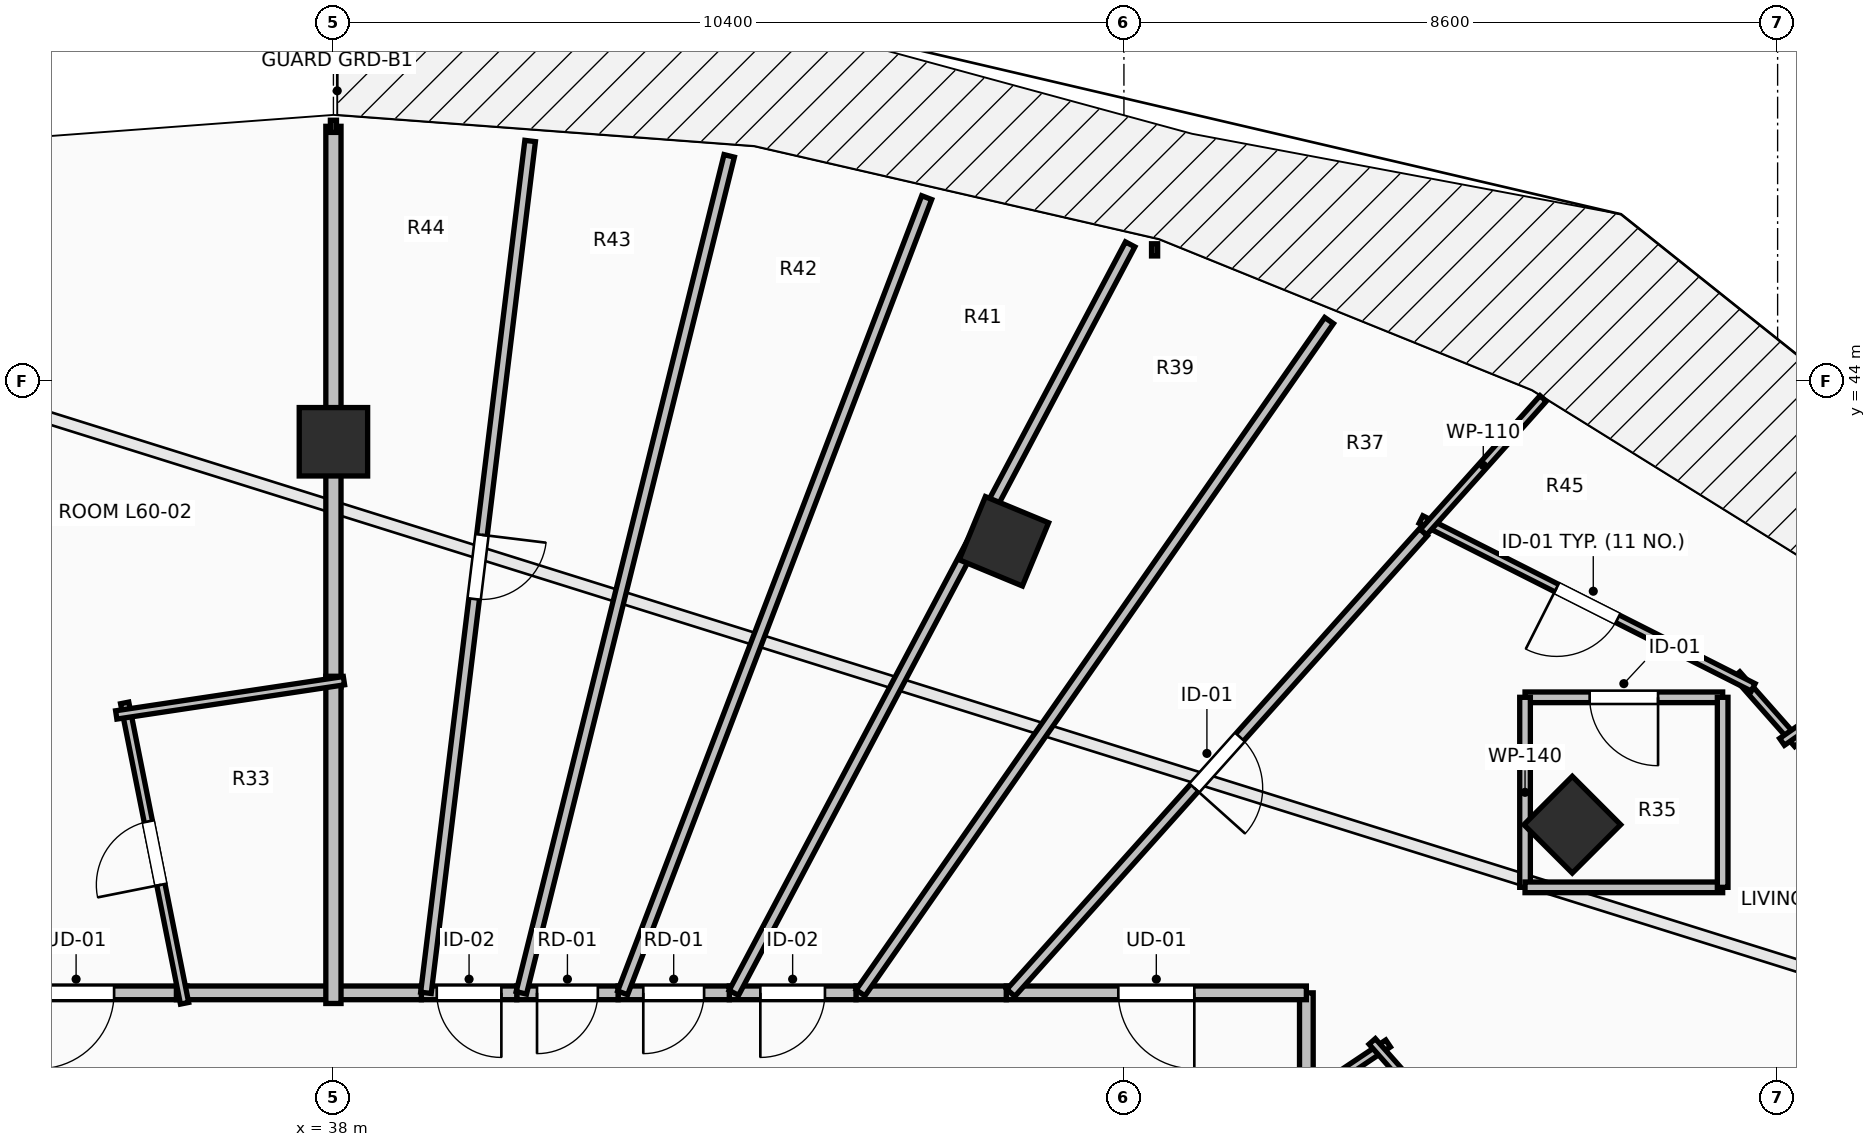
"""IFC4 building model, lengths in metres.
Left out: names, types, materials, properties, quantities, classifications, styles, units other than length and angle.
Written with IfcOpenShell. Run it as: python <this file> out.ifc"""

import sys

from ifc_helpers import new_model, si_unit, direction, frame, frame_2d, origin, origin_2d, place, context, subcontext, project, spatial, rectangle, extrude, element, fill, save


model = new_model("IFC4")
c1 = context("Model", 3, precision=1e-05, world=origin(), true_north=direction((0.0, 1.0)))
c2 = subcontext(c1, "Body", "Model", "MODEL_VIEW")
j1 = project(units=[si_unit("LENGTHUNIT", "METRE"), si_unit("PLANEANGLEUNIT", "RADIAN")], contexts=[c1])
p1 = place(None, origin())
s1 = spatial("IfcSite", under=j1, at=p1, CompositionType="ELEMENT")
p2 = place(p1, origin())
s2 = spatial("IfcBuilding", under=s1, at=p2, CompositionType="ELEMENT")
p3 = place(p2, frame((0.0, 0.0, 221.4)))
s3 = spatial("IfcBuildingStorey", under=s2, at=p3, CompositionType="ELEMENT", Elevation=221.4)
for number, where, z_axis, x_axis in (
    (1, (54.299, 38.162, 0.0), (0.0, 0.0, 1.0), (0.707, 0.707, 0.0)),
    (2, (46.821, 41.891, 0.0), (0.0, 0.0, 1.0), (0.383, 0.924, 0.0)),
    (3, (38.0, 43.2, 0.0), (0.0, 0.0, 1.0), (0.0, 1.0, 0.0)),
):
    element("IfcColumn", number, at=place(p3, frame(where, z_axis=z_axis, x_axis=x_axis)), inside=s3, PredefinedType="COLUMN", context=c2, shape_type="SweptSolid", body=[
        extrude(rectangle(XDim=0.9, YDim=0.9, at=origin_2d()), origin(), (0.0, 0.0, 1.0), 3.55),
    ])
p4 = place(p3, frame((50.8, 34.504, 0.0), z_axis=(0.0, 0.0, 1.0), x_axis=(0.0, 1.0, 0.0)))
e4 = element("IfcWall", 4, at=p4, inside=s3, PredefinedType="PARTITIONING", context=c2, shape_type="SweptSolid", body=[
    extrude(rectangle(XDim=1.446, YDim=0.18, at=frame_2d((0.723, 0.0))), origin(), (0.0, 0.0, 1.0), 2.392),
])
p5 = place(p3, frame((50.8, 35.95, 0.0), z_axis=(0.0, 0.0, 1.0), x_axis=(-1.0, 0.0, 0.0)))
e5 = element("IfcWall", 5, at=p5, inside=s3, PredefinedType="PARTITIONING", context=c2, shape_type="SweptSolid", body=[
    extrude(rectangle(XDim=3.948, YDim=0.18, at=frame_2d((1.974, 0.0))), origin(), (0.0, 0.0, 1.0), 2.392),
])
p6 = place(p5, frame((1.474, 0.0, 0.0)))
e6 = element("IfcOpeningElement", 6, at=p6, cuts=e5, PredefinedType="OPENING", context=c2, shape_type="SweptSolid", body=[
    extrude(rectangle(XDim=1.0, YDim=2.15, at=frame_2d((0.5, 1.075))), frame((0.0, 0.105, 0.0), z_axis=(0.0, -1.0, 0.0), x_axis=(1.0, 0.0, 0.0)), (0.0, 0.0, 1.0), 0.21),
])
p7 = place(p3, frame((46.852, 35.95, 0.0), z_axis=(0.0, 0.0, 1.0), x_axis=(-1.0, 0.0, 0.0)))
e7 = element("IfcWall", 7, at=p7, inside=s3, PredefinedType="PARTITIONING", context=c2, shape_type="SweptSolid", body=[
    extrude(rectangle(XDim=1.977, YDim=0.18, at=frame_2d((0.989, 0.0))), origin(), (0.0, 0.0, 1.0), 3.2),
])
p8 = place(p3, frame((44.875, 35.95, 0.0), z_axis=(0.0, 0.0, 1.0), x_axis=(-1.0, 0.0, 0.0)))
e8 = element("IfcWall", 8, at=p8, inside=s3, PredefinedType="PARTITIONING", context=c2, shape_type="SweptSolid", body=[
    extrude(rectangle(XDim=1.667, YDim=0.18, at=frame_2d((0.833, 0.0))), origin(), (0.0, 0.0, 1.0), 3.2),
])
p9 = place(p8, frame((0.408, 0.0, 0.0)))
e9 = element("IfcOpeningElement", 9, at=p9, cuts=e8, PredefinedType="OPENING", context=c2, shape_type="SweptSolid", body=[
    extrude(rectangle(XDim=0.85, YDim=2.1, at=frame_2d((0.425, 1.05))), frame((0.0, 0.105, 0.0), z_axis=(0.0, -1.0, 0.0), x_axis=(1.0, 0.0, 0.0)), (0.0, 0.0, 1.0), 0.21),
])
p10 = place(p3, frame((43.208, 35.95, 0.0), z_axis=(0.0, 0.0, 1.0), x_axis=(-1.0, 0.0, 0.0)))
e10 = element("IfcWall", 10, at=p10, inside=s3, PredefinedType="PARTITIONING", context=c2, shape_type="SweptSolid", body=[
    extrude(rectangle(XDim=1.463, YDim=0.18, at=frame_2d((0.731, 0.0))), origin(), (0.0, 0.0, 1.0), 3.2),
])
p11 = place(p10, frame((0.332, 0.0, 0.0)))
e11 = element("IfcOpeningElement", 11, at=p11, cuts=e10, PredefinedType="OPENING", context=c2, shape_type="SweptSolid", body=[
    extrude(rectangle(XDim=0.8, YDim=2.05, at=frame_2d((0.4, 1.025))), frame((0.0, 0.105, 0.0), z_axis=(0.0, -1.0, 0.0), x_axis=(1.0, 0.0, 0.0)), (0.0, 0.0, 1.0), 0.21),
])
p12 = place(p3, frame((41.745, 35.95, 0.0), z_axis=(0.0, 0.0, 1.0), x_axis=(-1.0, 0.0, 0.0)))
e12 = element("IfcWall", 12, at=p12, inside=s3, PredefinedType="PARTITIONING", context=c2, shape_type="SweptSolid", body=[
    extrude(rectangle(XDim=1.333, YDim=0.18, at=frame_2d((0.667, 0.0))), origin(), (0.0, 0.0, 1.0), 3.2),
])
p13 = place(p12, frame((0.267, 0.0, 0.0)))
e13 = element("IfcOpeningElement", 13, at=p13, cuts=e12, PredefinedType="OPENING", context=c2, shape_type="SweptSolid", body=[
    extrude(rectangle(XDim=0.8, YDim=2.05, at=frame_2d((0.4, 1.025))), frame((0.0, 0.105, 0.0), z_axis=(0.0, -1.0, 0.0), x_axis=(1.0, 0.0, 0.0)), (0.0, 0.0, 1.0), 0.21),
])
p14 = place(p3, frame((40.412, 35.95, 0.0), z_axis=(0.0, 0.0, 1.0), x_axis=(-1.0, 0.0, 0.0)))
e14 = element("IfcWall", 14, at=p14, inside=s3, PredefinedType="PARTITIONING", context=c2, shape_type="SweptSolid", body=[
    extrude(rectangle(XDim=1.255, YDim=0.18, at=frame_2d((0.627, 0.0))), origin(), (0.0, 0.0, 1.0), 3.2),
])
p15 = place(p14, frame((0.202, 0.0, 0.0)))
e15 = element("IfcOpeningElement", 15, at=p15, cuts=e14, PredefinedType="OPENING", context=c2, shape_type="SweptSolid", body=[
    extrude(rectangle(XDim=0.85, YDim=2.1, at=frame_2d((0.425, 1.05))), frame((0.0, 0.105, 0.0), z_axis=(0.0, -1.0, 0.0), x_axis=(1.0, 0.0, 0.0)), (0.0, 0.0, 1.0), 0.21),
])
p16 = place(p3, frame((39.157, 35.95, 0.0), z_axis=(0.0, 0.0, 1.0), x_axis=(-1.0, 0.0, 0.0)))
e16 = element("IfcWall", 16, at=p16, inside=s3, PredefinedType="PARTITIONING", context=c2, shape_type="SweptSolid", body=[
    extrude(rectangle(XDim=1.217, YDim=0.18, at=frame_2d((0.608, 0.0))), origin(), (0.0, 0.0, 1.0), 3.2),
])
p17 = place(p3, frame((36.074, 35.95, 0.0), z_axis=(0.0, 0.0, 1.0), x_axis=(-1.0, 0.0, 0.0)))
e17 = element("IfcWall", 17, at=p17, inside=s3, PredefinedType="PARTITIONING", context=c2, shape_type="SweptSolid", body=[
    extrude(rectangle(XDim=2.919, YDim=0.18, at=frame_2d((1.459, 0.0))), origin(), (0.0, 0.0, 1.0), 3.2),
])
p18 = place(p17, frame((0.959, 0.0, 0.0)))
e18 = element("IfcOpeningElement", 18, at=p18, cuts=e17, PredefinedType="OPENING", context=c2, shape_type="SweptSolid", body=[
    extrude(rectangle(XDim=1.0, YDim=2.15, at=frame_2d((0.5, 1.075))), frame((0.0, 0.105, 0.0), z_axis=(0.0, -1.0, 0.0), x_axis=(1.0, 0.0, 0.0)), (0.0, 0.0, 1.0), 0.21),
])
p19 = place(p3, frame((38.08, 35.95, 0.0), z_axis=(0.0, 0.0, 1.0), x_axis=(-1.0, 0.0, 0.0)))
e19 = element("IfcWall", 19, at=p19, inside=s3, PredefinedType="PARTITIONING", context=c2, shape_type="SweptSolid", body=[
    extrude(rectangle(XDim=2.146, YDim=0.18, at=frame_2d((1.073, 0.0))), origin(), (0.0, 0.0, 1.0), 3.2),
])
p20 = place(p3, frame((50.684, 34.486, 0.0), z_axis=(0.0, 0.0, 1.0), x_axis=(0.830948636418, 0.556349138253, 0.0)))
e20 = element("IfcWall", 20, at=p20, inside=s3, PredefinedType="PARTITIONING", context=c2, shape_type="SweptSolid", body=[
    extrude(rectangle(XDim=1.434, YDim=0.11, at=frame_2d((0.717, 0.0))), origin(), (0.0, 0.0, 1.0), 2.834),
])
p21 = place(p3, frame((51.666, 35.311, 0.0), z_axis=(0.0, 0.0, 1.0), x_axis=(0.662288118602, -0.749249256228, 0.0)))
e21 = element("IfcWall", 21, at=p21, inside=s3, PredefinedType="PARTITIONING", context=c2, shape_type="SweptSolid", body=[
    extrude(rectangle(XDim=3.706, YDim=0.11, at=frame_2d((1.853, 0.0))), origin(), (0.0, 0.0, 1.0), 2.392),
])
p22 = place(p21, frame((1.428, 0.0, 0.0)))
e22 = element("IfcOpeningElement", 22, at=p22, cuts=e21, PredefinedType="OPENING", context=c2, shape_type="SweptSolid", body=[
    extrude(rectangle(XDim=0.85, YDim=2.1, at=frame_2d((0.425, 1.05))), frame((0.0, 0.07, 0.0), z_axis=(0.0, -1.0, 0.0), x_axis=(1.0, 0.0, 0.0)), (0.0, 0.0, 1.0), 0.14),
])
p23 = place(p3, frame((57.266, 39.227, 0.0), z_axis=(0.0, 0.0, 1.0), x_axis=(-0.662352650652, 0.749192209099, 0.0)))
e23 = element("IfcWall", 23, at=p23, inside=s3, PredefinedType="PARTITIONING", context=c2, shape_type="SweptSolid", body=[
    extrude(rectangle(XDim=1.215, YDim=0.11, at=frame_2d((0.607, 0.0))), origin(), (0.0, 0.0, 1.0), 3.2),
])
p24 = place(p3, frame((56.679, 39.969, 0.0), z_axis=(0.0, 0.0, 1.0), x_axis=(-0.892574903925, 0.450899147131, 0.0)))
e24 = element("IfcWall", 24, at=p24, inside=s3, PredefinedType="PARTITIONING", context=c2, shape_type="SweptSolid", body=[
    extrude(rectangle(XDim=4.897, YDim=0.11, at=frame_2d((2.448, 0.0))), origin(), (0.0, 0.0, 1.0), 3.2),
])
p25 = place(p24, frame((1.999, 0.0, 0.0)))
e25 = element("IfcOpeningElement", 25, at=p25, cuts=e24, PredefinedType="OPENING", context=c2, shape_type="SweptSolid", body=[
    extrude(rectangle(XDim=0.9, YDim=2.1, at=frame_2d((0.45, 1.05))), frame((0.0, 0.07, 0.0), z_axis=(0.0, -1.0, 0.0), x_axis=(1.0, 0.0, 0.0)), (0.0, 0.0, 1.0), 0.14),
])
p26 = place(p3, frame((52.34, 42.01, 0.0), z_axis=(0.0, 0.0, 1.0), x_axis=(0.667118090827, 0.744951980259, 0.0)))
e26 = element("IfcWall", 26, at=p26, inside=s3, PredefinedType="PARTITIONING", context=c2, shape_type="SweptSolid", body=[
    extrude(rectangle(XDim=2.362, YDim=0.11, at=frame_2d((1.181, 0.0))), origin(), (0.0, 0.0, 1.0), 3.2),
])
p27 = place(p3, frame((58.828, 40.483, 0.0), z_axis=(0.0, 0.0, 1.0), x_axis=(-0.820999835833, -0.570928427705, 0.0)))
e27 = element("IfcWall", 27, at=p27, inside=s3, PredefinedType="PARTITIONING", context=c2, shape_type="SweptSolid", body=[
    extrude(rectangle(XDim=2.156, YDim=0.11, at=frame_2d((1.078, 0.0))), origin(), (0.0, 0.0, 1.0), 3.2),
])
p28 = place(p3, frame((56.277, 39.838, 0.0), z_axis=(0.0, 0.0, 1.0), x_axis=(-1.0, 0.0, 0.0)))
e28 = element("IfcWall", 28, at=p28, inside=s3, PredefinedType="PARTITIONING", context=c2, shape_type="SweptSolid", body=[
    extrude(rectangle(XDim=2.6, YDim=0.14, at=frame_2d((1.3, 0.0))), origin(), (0.0, 0.0, 1.0), 3.2),
])
p29 = place(p28, frame((0.85, 0.0, 0.0)))
e29 = element("IfcOpeningElement", 29, at=p29, cuts=e28, PredefinedType="OPENING", context=c2, shape_type="SweptSolid", body=[
    extrude(rectangle(XDim=0.9, YDim=2.1, at=frame_2d((0.45, 1.05))), frame((0.0, 0.085, 0.0), z_axis=(0.0, -1.0, 0.0), x_axis=(1.0, 0.0, 0.0)), (0.0, 0.0, 1.0), 0.17),
])
p30 = place(p3, frame((53.677, 39.838, 0.0), z_axis=(0.0, 0.0, 1.0), x_axis=(0.0, -1.0, 0.0)))
e30 = element("IfcWall", 30, at=p30, inside=s3, PredefinedType="PARTITIONING", context=c2, shape_type="SweptSolid", body=[
    extrude(rectangle(XDim=2.5, YDim=0.14, at=frame_2d((1.25, 0.0))), origin(), (0.0, 0.0, 1.0), 2.392),
])
p31 = place(p3, frame((53.677, 37.338, 0.0), z_axis=(0.0, 0.0, 1.0), x_axis=(1.0, 0.0, 0.0)))
e31 = element("IfcWall", 31, at=p31, inside=s3, PredefinedType="PARTITIONING", context=c2, shape_type="SweptSolid", body=[
    extrude(rectangle(XDim=2.6, YDim=0.14, at=frame_2d((1.3, 0.0))), origin(), (0.0, 0.0, 1.0), 2.392),
])
p32 = place(p3, frame((56.277, 37.338, 0.0), z_axis=(0.0, 0.0, 1.0), x_axis=(0.0, 1.0, 0.0)))
e32 = element("IfcWall", 32, at=p32, inside=s3, PredefinedType="PARTITIONING", context=c2, shape_type="SweptSolid", body=[
    extrude(rectangle(XDim=2.5, YDim=0.14, at=frame_2d((1.25, 0.0))), origin(), (0.0, 0.0, 1.0), 3.2),
])
p33 = place(p3, frame((52.34, 42.01, 0.0), z_axis=(0.0, 0.0, 1.0), x_axis=(-0.667173742476, -0.744902139445, 0.0)))
e33 = element("IfcWall", 33, at=p33, inside=s3, PredefinedType="PARTITIONING", context=c2, shape_type="SweptSolid", body=[
    extrude(rectangle(XDim=8.135, YDim=0.14, at=frame_2d((4.067, 0.0))), origin(), (0.0, 0.0, 1.0), 2.392),
])
p34 = place(p33, frame((3.617, 0.0, 0.0)))
e34 = element("IfcOpeningElement", 34, at=p34, cuts=e33, PredefinedType="OPENING", context=c2, shape_type="SweptSolid", body=[
    extrude(rectangle(XDim=0.9, YDim=2.1, at=frame_2d((0.45, 1.05))), frame((0.0, 0.085, 0.0), z_axis=(0.0, -1.0, 0.0), x_axis=(1.0, 0.0, 0.0)), (0.0, 0.0, 1.0), 0.17),
])
p35 = place(p3, frame((54.157, 32.692, 0.0), z_axis=(0.0, 0.0, 1.0), x_axis=(0.923874230192, 0.382696233045, 0.0)))
e35 = element("IfcWall", 35, at=p35, inside=s3, PredefinedType="PARTITIONING", context=c2, shape_type="SweptSolid", body=[
    extrude(rectangle(XDim=9.181, YDim=0.2, at=frame_2d((4.591, 0.0))), origin(), (0.0, 0.0, 1.0), 2.392),
])
p36 = place(p3, frame((51.099, 44.795, 0.0), z_axis=(0.0, 0.0, 1.0), x_axis=(-0.571754326018, -0.82042488424, 0.0)))
e36 = element("IfcWall", 36, at=p36, inside=s3, PredefinedType="PARTITIONING", context=c2, shape_type="SweptSolid", body=[
    extrude(rectangle(XDim=10.781, YDim=0.14, at=frame_2d((5.391, 0.0))), origin(), (0.0, 0.0, 1.0), 2.392),
])
p37 = place(p3, frame((48.482, 45.797, 0.0), z_axis=(0.0, 0.0, 1.0), x_axis=(-0.46793402924, -0.883763398359, 0.0)))
e37 = element("IfcWall", 37, at=p37, inside=s3, PredefinedType="PARTITIONING", context=c2, shape_type="SweptSolid", body=[
    extrude(rectangle(XDim=11.142, YDim=0.14, at=frame_2d((5.571, 0.0))), origin(), (0.0, 0.0, 1.0), 2.734),
])
p38 = place(p3, frame((45.805, 46.412, 0.0), z_axis=(0.0, 0.0, 1.0), x_axis=(-0.357119008819, -0.934058891901, 0.0)))
e38 = element("IfcWall", 38, at=p38, inside=s3, PredefinedType="PARTITIONING", context=c2, shape_type="SweptSolid", body=[
    extrude(rectangle(XDim=11.201, YDim=0.14, at=frame_2d((5.6, 0.0))), origin(), (0.0, 0.0, 1.0), 2.734),
])
p39 = place(p3, frame((43.207, 46.961, 0.0), z_axis=(0.0, 0.0, 1.0), x_axis=(-0.241072089133, -0.970507211638, 0.0)))
e39 = element("IfcWall", 39, at=p39, inside=s3, PredefinedType="PARTITIONING", context=c2, shape_type="SweptSolid", body=[
    extrude(rectangle(XDim=11.346, YDim=0.14, at=frame_2d((5.673, 0.0))), origin(), (0.0, 0.0, 1.0), 2.734),
])
p40 = place(p3, frame((40.588, 47.157, 0.0), z_axis=(0.0, 0.0, 1.0), x_axis=(-0.121415539359, -0.992601766471, 0.0)))
e40 = element("IfcWall", 40, at=p40, inside=s3, PredefinedType="PARTITIONING", context=c2, shape_type="SweptSolid", body=[
    extrude(rectangle(XDim=11.291, YDim=0.14, at=frame_2d((5.645, 0.0))), origin(), (0.0, 0.0, 1.0), 2.734),
])
p41 = place(p40, frame((5.22, 0.0, 0.0)))
e41 = element("IfcOpeningElement", 41, at=p41, cuts=e40, PredefinedType="OPENING", context=c2, shape_type="SweptSolid", body=[
    extrude(rectangle(XDim=0.85, YDim=2.1, at=frame_2d((0.425, 1.05))), frame((0.0, 0.085, 0.0), z_axis=(0.0, -1.0, 0.0), x_axis=(1.0, 0.0, 0.0)), (0.0, 0.0, 1.0), 0.17),
])
p42 = place(p3, frame((38.0, 47.35, 0.0), z_axis=(0.0, 0.0, 1.0), x_axis=(0.0, -1.0, 0.0)))
e42 = element("IfcWall", 42, at=p42, inside=s3, PredefinedType="PARTITIONING", context=c2, shape_type="SweptSolid", body=[
    extrude(rectangle(XDim=7.375, YDim=0.2, at=frame_2d((3.688, 0.0))), origin(), (0.0, 0.0, 1.0), 2.889),
])
p43 = place(p3, frame((38.0, 40.115, 0.0), z_axis=(0.0, 0.0, 1.0), x_axis=(0.0, -1.0, 0.0)))
e43 = element("IfcWall", 43, at=p43, inside=s3, PredefinedType="PARTITIONING", context=c2, shape_type="SweptSolid", body=[
    extrude(rectangle(XDim=4.305, YDim=0.2, at=frame_2d((2.152, 0.0))), origin(), (0.0, 0.0, 1.0), 2.834),
])
p44 = place(p3, frame((36.042, 35.813, 0.0), z_axis=(0.0, 0.0, 1.0), x_axis=(-0.195521857349, 0.980699343988, 0.0)))
e44 = element("IfcWall", 44, at=p44, inside=s3, PredefinedType="PARTITIONING", context=c2, shape_type="SweptSolid", body=[
    extrude(rectangle(XDim=4.03, YDim=0.11, at=frame_2d((2.015, 0.0))), origin(), (0.0, 0.0, 1.0), 2.834),
])
p45 = place(p44, frame((1.59, 0.0, 0.0)))
e45 = element("IfcOpeningElement", 45, at=p45, cuts=e44, PredefinedType="OPENING", context=c2, shape_type="SweptSolid", body=[
    extrude(rectangle(XDim=0.85, YDim=2.1, at=frame_2d((0.425, 1.05))), frame((0.0, 0.07, 0.0), z_axis=(0.0, -1.0, 0.0), x_axis=(1.0, 0.0, 0.0)), (0.0, 0.0, 1.0), 0.14),
])
p46 = place(p3, frame((35.143, 39.606, 0.0), z_axis=(0.0, 0.0, 1.0), x_axis=(0.988873015636, 0.148762088409, 0.0)))
e46 = element("IfcWall", 46, at=p46, inside=s3, PredefinedType="PARTITIONING", context=c2, shape_type="SweptSolid", body=[
    extrude(rectangle(XDim=3.03, YDim=0.11, at=frame_2d((1.515, 0.0))), origin(), (0.0, 0.0, 1.0), 2.889),
])
p47 = place(p6, origin())
e47 = element("IfcDoor", 47, at=p47, inside=s3, OperationType="SINGLE_SWING_LEFT", PredefinedType="DOOR", context=c2, shape_type="SweptSolid", body=[
    extrude(rectangle(XDim=1.0, YDim=2.15, at=frame_2d((0.5, 1.075))), frame((0.0, 0.025, 0.0), z_axis=(0.0, -1.0, 0.0), x_axis=(1.0, 0.0, 0.0)), (0.0, 0.0, 1.0), 0.05),
])
fill(e6, e47)
p48 = place(p18, origin())
e48 = element("IfcDoor", 48, at=p48, inside=s3, OperationType="SINGLE_SWING_RIGHT", PredefinedType="DOOR", context=c2, shape_type="SweptSolid", body=[
    extrude(rectangle(XDim=1.0, YDim=2.15, at=frame_2d((0.5, 1.075))), frame((0.0, 0.025, 0.0), z_axis=(0.0, -1.0, 0.0), x_axis=(1.0, 0.0, 0.0)), (0.0, 0.0, 1.0), 0.05),
])
fill(e18, e48)
p49 = place(p25, origin())
e49 = element("IfcDoor", 49, at=p49, inside=s3, OperationType="SINGLE_SWING_RIGHT", PredefinedType="DOOR", context=c2, shape_type="SweptSolid", body=[
    extrude(rectangle(XDim=0.9, YDim=2.1, at=frame_2d((0.45, 1.05))), frame((0.0, 0.025, 0.0), z_axis=(0.0, -1.0, 0.0), x_axis=(1.0, 0.0, 0.0)), (0.0, 0.0, 1.0), 0.05),
])
fill(e25, e49)
p50 = place(p29, origin())
e50 = element("IfcDoor", 50, at=p50, inside=s3, OperationType="SINGLE_SWING_LEFT", PredefinedType="DOOR", context=c2, shape_type="SweptSolid", body=[
    extrude(rectangle(XDim=0.9, YDim=2.1, at=frame_2d((0.45, 1.05))), frame((0.0, 0.025, 0.0), z_axis=(0.0, -1.0, 0.0), x_axis=(1.0, 0.0, 0.0)), (0.0, 0.0, 1.0), 0.05),
])
fill(e29, e50)
p51 = place(p34, origin())
e51 = element("IfcDoor", 51, at=p51, inside=s3, OperationType="SINGLE_SWING_RIGHT", PredefinedType="DOOR", context=c2, shape_type="SweptSolid", body=[
    extrude(rectangle(XDim=0.9, YDim=2.1, at=frame_2d((0.45, 1.05))), frame((0.0, 0.025, 0.0), z_axis=(0.0, -1.0, 0.0), x_axis=(1.0, 0.0, 0.0)), (0.0, 0.0, 1.0), 0.05),
])
fill(e34, e51)
p52 = place(p45, origin())
e52 = element("IfcDoor", 52, at=p52, inside=s3, OperationType="SINGLE_SWING_LEFT", PredefinedType="DOOR", context=c2, shape_type="SweptSolid", body=[
    extrude(rectangle(XDim=0.85, YDim=2.1, at=frame_2d((0.425, 1.05))), frame((0.0, 0.025, 0.0), z_axis=(0.0, -1.0, 0.0), x_axis=(1.0, 0.0, 0.0)), (0.0, 0.0, 1.0), 0.05),
])
fill(e45, e52)
p53 = place(p9, origin())
e53 = element("IfcDoor", 53, at=p53, inside=s3, OperationType="SINGLE_SWING_RIGHT", PredefinedType="DOOR", context=c2, shape_type="SweptSolid", body=[
    extrude(rectangle(XDim=0.85, YDim=2.1, at=frame_2d((0.425, 1.05))), frame((0.0, 0.025, 0.0), z_axis=(0.0, -1.0, 0.0), x_axis=(1.0, 0.0, 0.0)), (0.0, 0.0, 1.0), 0.05),
])
fill(e9, e53)
p54 = place(p11, origin())
e54 = element("IfcDoor", 54, at=p54, inside=s3, OperationType="SINGLE_SWING_RIGHT", PredefinedType="DOOR", context=c2, shape_type="SweptSolid", body=[
    extrude(rectangle(XDim=0.8, YDim=2.05, at=frame_2d((0.4, 1.025))), frame((0.0, 0.025, 0.0), z_axis=(0.0, -1.0, 0.0), x_axis=(1.0, 0.0, 0.0)), (0.0, 0.0, 1.0), 0.05),
])
fill(e11, e54)
p55 = place(p13, origin())
e55 = element("IfcDoor", 55, at=p55, inside=s3, OperationType="SINGLE_SWING_RIGHT", PredefinedType="DOOR", context=c2, shape_type="SweptSolid", body=[
    extrude(rectangle(XDim=0.8, YDim=2.05, at=frame_2d((0.4, 1.025))), frame((0.0, 0.025, 0.0), z_axis=(0.0, -1.0, 0.0), x_axis=(1.0, 0.0, 0.0)), (0.0, 0.0, 1.0), 0.05),
])
fill(e13, e55)
p56 = place(p15, origin())
e56 = element("IfcDoor", 56, at=p56, inside=s3, OperationType="SINGLE_SWING_LEFT", PredefinedType="DOOR", context=c2, shape_type="SweptSolid", body=[
    extrude(rectangle(XDim=0.85, YDim=2.1, at=frame_2d((0.425, 1.05))), frame((0.0, 0.025, 0.0), z_axis=(0.0, -1.0, 0.0), x_axis=(1.0, 0.0, 0.0)), (0.0, 0.0, 1.0), 0.05),
])
fill(e15, e56)
p57 = place(p41, origin())
e57 = element("IfcDoor", 57, at=p57, inside=s3, OperationType="SINGLE_SWING_LEFT", PredefinedType="DOOR", context=c2, shape_type="SweptSolid", body=[
    extrude(rectangle(XDim=0.85, YDim=2.1, at=frame_2d((0.425, 1.05))), frame((0.0, 0.025, 0.0), z_axis=(0.0, -1.0, 0.0), x_axis=(1.0, 0.0, 0.0)), (0.0, 0.0, 1.0), 0.05),
])
fill(e41, e57)
save(model, sys.argv[1])
